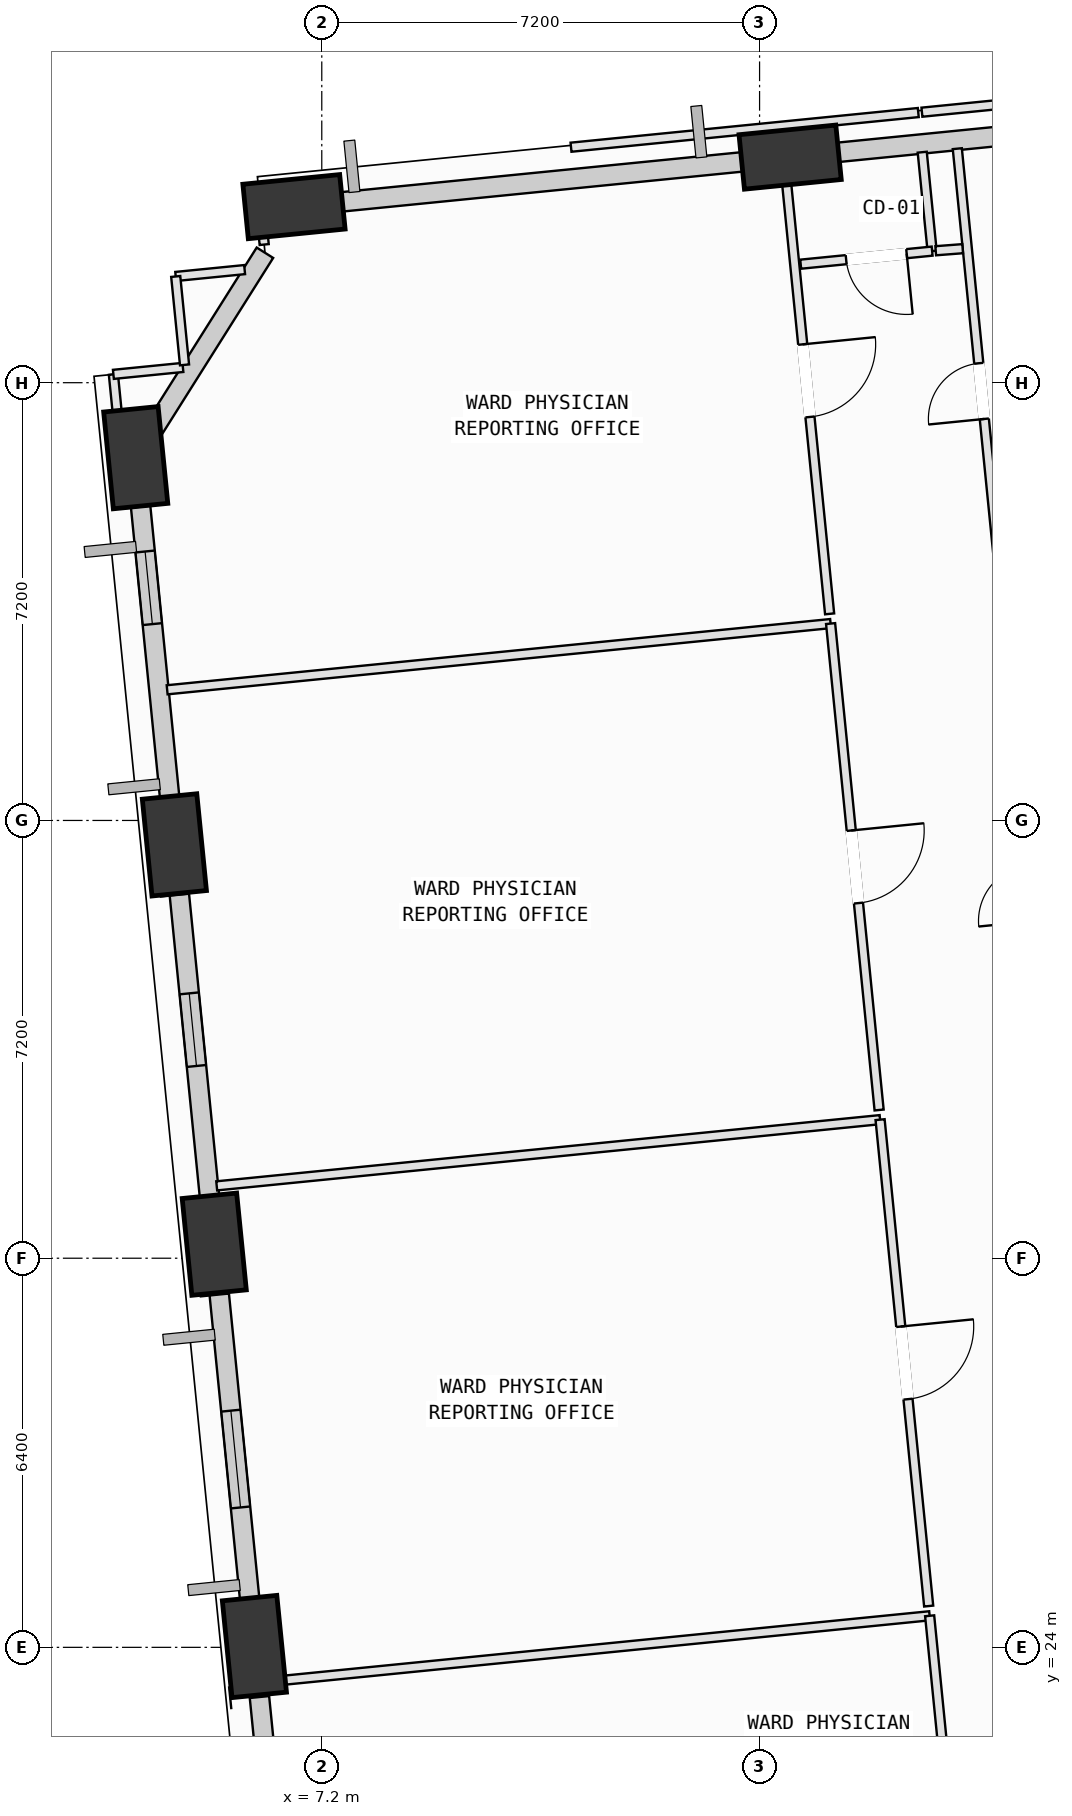
"""IFC4 building model, lengths in metres.
Left out: names, types, materials, properties, quantities, classifications, styles, units other than length and angle.
Written with IfcOpenShell. Run it as: python <this file> out.ifc"""

import sys

from ifc_helpers import new_model, si_unit, direction, frame, frame_2d, origin, origin_2d, place, context, subcontext, project, spatial, rectangle, extrude, element, fill, save


model = new_model("IFC4")
c1 = context("Model", 3, precision=1e-05, world=origin(), true_north=direction((0.0, 1.0)))
c2 = subcontext(c1, "Body", "Model", "MODEL_VIEW")
j1 = project(units=[si_unit("LENGTHUNIT", "METRE"), si_unit("PLANEANGLEUNIT", "RADIAN")], contexts=[c1])
p1 = place(None, origin())
s1 = spatial("IfcSite", under=j1, at=p1, CompositionType="ELEMENT")
p2 = place(p1, origin())
s2 = spatial("IfcBuilding", under=s1, at=p2, CompositionType="ELEMENT")
p3 = place(p2, frame((0.0, 0.0, 47.0)))
s3 = spatial("IfcBuildingStorey", under=s2, at=p3, CompositionType="ELEMENT", Elevation=47.0)
p4 = place(p3, frame((14.903, 48.51, 0.002), z_axis=(-0.096922045865, -0.077707356347, 0.992253840403), x_axis=(0.699324081061, -0.714698257248, 0.01233818203)))
e1 = element("IfcColumn", 1, at=p4, inside=s3, PredefinedType="COLUMN", context=c2, shape_type="SweptSolid", body=[
    extrude(rectangle(XDim=1.6, YDim=0.9, at=origin_2d()), origin(), (0.0, 0.0, 1.0), 4.028),
])
p5 = place(p3, frame((6.743, 47.696, 0.002), z_axis=(-0.092963260018, -0.110915202947, 0.989472409945), x_axis=(0.825741644185, -0.563865350369, 0.014373715995)))
e2 = element("IfcColumn", 2, at=p5, inside=s3, PredefinedType="COLUMN", context=c2, shape_type="SweptSolid", body=[
    extrude(rectangle(XDim=1.6, YDim=0.9, at=origin_2d()), origin(), (0.0, 0.0, 1.0), 4.039),
])
p6 = place(p3, frame((4.14, 43.567, 0.002), z_axis=(-0.075994605192, -0.121458362634, 0.9896831241), x_axis=(0.438151249377, 0.8875238919, 0.142565156951)))
e3 = element("IfcColumn", 3, at=p6, inside=s3, PredefinedType="COLUMN", context=c2, shape_type="SweptSolid", body=[
    extrude(rectangle(XDim=1.6, YDim=0.9, at=origin_2d()), origin(), (0.0, 0.0, 1.0), 4.038),
])
p7 = place(p3, frame((4.776, 37.198, 0.002), z_axis=(-0.049976419905, -0.118853013156, 0.991653325874), x_axis=(0.290924984757, 0.948104928167, 0.12829535623)))
e4 = element("IfcColumn", 4, at=p7, inside=s3, PredefinedType="COLUMN", context=c2, shape_type="SweptSolid", body=[
    extrude(rectangle(XDim=1.6, YDim=0.9, at=origin_2d()), origin(), (0.0, 0.0, 1.0), 4.03),
])
p8 = place(p3, frame((5.432, 30.631, 0.002), z_axis=(-0.023050008903, -0.116099255371, 0.992970120392), x_axis=(0.094992830329, 0.988485824862, 0.117780033251)))
e5 = element("IfcColumn", 5, at=p8, inside=s3, PredefinedType="COLUMN", context=c2, shape_type="SweptSolid", body=[
    extrude(rectangle(XDim=1.6, YDim=0.9, at=origin_2d()), origin(), (0.0, 0.0, 1.0), 4.025),
])
p9 = place(p3, frame((6.092, 24.014, 0.002), z_axis=(0.004187870803, -0.113254593007, 0.99355717445), x_axis=(-0.135784547747, 0.984299301738, 0.112771632916)))
e6 = element("IfcColumn", 6, at=p9, inside=s3, PredefinedType="COLUMN", context=c2, shape_type="SweptSolid", body=[
    extrude(rectangle(XDim=1.6, YDim=0.9, at=origin_2d()), origin(), (0.0, 0.0, 1.0), 4.022),
])
p10 = place(p3, frame((15.283, 48.548, 0.0), z_axis=(0.0, 0.0, 1.0), x_axis=(0.995052021169, 0.099355297633, 0.0)))
e7 = element("IfcWall", 7, at=p10, inside=s3, PredefinedType="SOLIDWALL", context=c2, shape_type="SweptSolid", body=[
    extrude(rectangle(XDim=7.003, YDim=0.32, at=frame_2d((3.501, 0.0))), origin(), (0.0, 0.0, 1.0), 3.165),
])
p11 = place(p3, frame((7.104, 47.732, 0.0), z_axis=(0.0, 0.0, 1.0), x_axis=(0.995058471393, 0.09929067685, 0.0)))
e8 = element("IfcWall", 8, at=p11, inside=s3, PredefinedType="SOLIDWALL", context=c2, shape_type="SweptSolid", body=[
    extrude(rectangle(XDim=7.035, YDim=0.32, at=frame_2d((3.517, 0.0))), origin(), (0.0, 0.0, 1.0), 3.165),
])
p12 = place(p3, frame((4.31, 43.836, 0.0), z_axis=(0.0, 0.0, 1.0), x_axis=(0.533233582552, 0.845968052848, 0.0)))
e9 = element("IfcWall", 9, at=p12, inside=s3, PredefinedType="SOLIDWALL", context=c2, shape_type="SweptSolid", body=[
    extrude(rectangle(XDim=3.666, YDim=0.32, at=frame_2d((1.833, 0.0))), origin(), (0.0, 0.0, 1.0), 3.165),
])
p13 = place(p3, frame((4.74, 37.563, 0.0), z_axis=(0.0, 0.0, 1.0), x_axis=(-0.099327854521, 0.995054760964, 0.0)))
e10 = element("IfcWall", 10, at=p13, inside=s3, PredefinedType="SOLIDWALL", context=c2, shape_type="SweptSolid", body=[
    extrude(rectangle(XDim=5.223, YDim=0.32, at=frame_2d((2.612, 0.0))), origin(), (0.0, 0.0, 1.0), 3.165),
])
p14 = place(p13, frame((3.282, 0.0, 0.75)))
e11 = element("IfcOpeningElement", 11, at=p14, cuts=e10, PredefinedType="OPENING", context=c2, shape_type="SweptSolid", body=[
    extrude(rectangle(XDim=1.2, YDim=1.75, at=frame_2d((0.6, 0.875))), frame((0.0, 0.17, 0.0), z_axis=(0.0, -1.0, 0.0), x_axis=(1.0, 0.0, 0.0)), (0.0, 0.0, 1.0), 0.34),
])
p15 = place(p3, frame((5.394, 31.005, 0.0), z_axis=(0.0, 0.0, 1.0), x_axis=(-0.099315735394, 0.995055970638, 0.0)))
e12 = element("IfcWall", 12, at=p15, inside=s3, PredefinedType="SOLIDWALL", context=c2, shape_type="SweptSolid", body=[
    extrude(rectangle(XDim=5.401, YDim=0.32, at=frame_2d((2.7, 0.0))), origin(), (0.0, 0.0, 1.0), 3.165),
])
p16 = place(p15, frame((2.57, 0.0, 0.75)))
e13 = element("IfcOpeningElement", 13, at=p16, cuts=e12, PredefinedType="OPENING", context=c2, shape_type="SweptSolid", body=[
    extrude(rectangle(XDim=1.2, YDim=1.75, at=frame_2d((0.6, 0.875))), frame((0.0, 0.17, 0.0), z_axis=(0.0, -1.0, 0.0), x_axis=(1.0, 0.0, 0.0)), (0.0, 0.0, 1.0), 0.34),
])
p17 = place(p3, frame((6.054, 24.392, 0.0), z_axis=(0.0, 0.0, 1.0), x_axis=(-0.099308134144, 0.995056729284, 0.0)))
e14 = element("IfcWall", 14, at=p17, inside=s3, PredefinedType="SOLIDWALL", context=c2, shape_type="SweptSolid", body=[
    extrude(rectangle(XDim=5.438, YDim=0.32, at=frame_2d((2.719, 0.0))), origin(), (0.0, 0.0, 1.0), 3.165),
])
p18 = place(p17, frame((1.918, 0.0, 0.75)))
e15 = element("IfcOpeningElement", 15, at=p18, cuts=e14, PredefinedType="OPENING", context=c2, shape_type="SweptSolid", body=[
    extrude(rectangle(XDim=1.6, YDim=1.95, at=frame_2d((0.8, 0.975))), frame((0.0, 0.17, 0.0), z_axis=(0.0, -1.0, 0.0), x_axis=(1.0, 0.0, 0.0)), (0.0, 0.0, 1.0), 0.34),
])
p19 = place(p3, frame((6.884, 16.082, 0.0), z_axis=(0.0, 0.0, 1.0), x_axis=(-0.099314033415, 0.99505614051, 0.0)))
e16 = element("IfcWall", 16, at=p19, inside=s3, PredefinedType="SOLIDWALL", context=c2, shape_type="SweptSolid", body=[
    extrude(rectangle(XDim=7.136, YDim=0.32, at=frame_2d((3.568, 0.0))), origin(), (0.0, 0.0, 1.0), 3.165),
])
p20 = place(p19, frame((2.569, 0.0, 0.75)))
e17 = element("IfcOpeningElement", 17, at=p20, cuts=e16, PredefinedType="OPENING", context=c2, shape_type="SweptSolid", body=[
    extrude(rectangle(XDim=2.0, YDim=1.95, at=frame_2d((1.0, 0.975))), frame((0.0, 0.17, 0.0), z_axis=(0.0, -1.0, 0.0), x_axis=(1.0, 0.0, 0.0)), (0.0, 0.0, 1.0), 0.34),
])
p21 = place(p3, frame((5.923, 23.394, 0.0), z_axis=(0.0, 0.0, 1.0), x_axis=(0.995058076509, 0.099294634167, 0.0)))
e18 = element("IfcWall", 18, at=p21, inside=s3, PredefinedType="PARTITIONING", context=c2, shape_type="SweptSolid", body=[
    extrude(rectangle(XDim=11.33, YDim=0.15, at=frame_2d((5.665, 0.0))), origin(), (0.0, 0.0, 1.0), 3.78),
])
p22 = place(p3, frame((17.197, 24.519, 0.0), z_axis=(0.0, 0.0, 1.0), x_axis=(0.099296099403, -0.995057930295, 0.0)))
e19 = element("IfcWall", 19, at=p22, inside=s3, PredefinedType="PARTITIONING", context=c2, shape_type="SweptSolid", body=[
    extrude(rectangle(XDim=3.958, YDim=0.15, at=frame_2d((1.979, 0.0))), origin(), (0.0, 0.0, 1.0), 3.78),
])
p23 = place(p3, frame((5.472, 31.59, 0.0), z_axis=(0.0, 0.0, 1.0), x_axis=(0.99505657203, 0.099309709794, 0.0)))
e20 = element("IfcWall", 20, at=p23, inside=s3, PredefinedType="PARTITIONING", context=c2, shape_type="SweptSolid", body=[
    extrude(rectangle(XDim=10.964, YDim=0.15, at=frame_2d((5.482, 0.0))), origin(), (0.0, 0.0, 1.0), 3.365),
])
p24 = place(p3, frame((16.382, 32.679, 0.0), z_axis=(0.0, 0.0, 1.0), x_axis=(0.099359401625, -0.995051611379, 0.0)))
e21 = element("IfcWall", 21, at=p24, inside=s3, PredefinedType="PARTITIONING", context=c2, shape_type="SweptSolid", body=[
    extrude(rectangle(XDim=8.04, YDim=0.15, at=frame_2d((4.02, 0.0))), origin(), (0.0, 0.0, 1.0), 3.78),
])
p25 = place(p24, frame((3.42, 0.0, 0.0)))
e22 = element("IfcOpeningElement", 22, at=p25, cuts=e21, PredefinedType="OPENING", context=c2, shape_type="SweptSolid", body=[
    extrude(rectangle(XDim=1.2, YDim=2.15, at=frame_2d((0.6, 1.075))), frame((0.0, 0.085, 0.0), z_axis=(0.0, -1.0, 0.0), x_axis=(1.0, 0.0, 0.0)), (0.0, 0.0, 1.0), 0.17),
])
p26 = place(p3, frame((5.907, 23.553, 0.0), z_axis=(0.0, 0.0, 1.0), x_axis=(-0.100034296973, 0.994983989534, 0.0)))
e23 = element("IfcWall", 23, at=p26, inside=s3, PredefinedType="PARTITIONING", context=c2, shape_type="SweptSolid", body=[
    extrude(rectangle(XDim=0.82, YDim=0.15, at=frame_2d((0.41, 0.0))), origin(), (0.0, 0.0, 1.0), 3.165),
])
p27 = place(p3, frame((5.285, 29.78, 0.0), z_axis=(0.0, 0.0, 1.0), x_axis=(-0.099243554259, 0.995063172335, 0.0)))
e24 = element("IfcWall", 24, at=p27, inside=s3, PredefinedType="PARTITIONING", context=c2, shape_type="SweptSolid", body=[
    extrude(rectangle(XDim=1.208, YDim=0.15, at=frame_2d((0.604, 0.0))), origin(), (0.0, 0.0, 1.0), 3.165),
])
p28 = place(p3, frame((4.657, 39.749, 0.0), z_axis=(0.0, 0.0, 1.0), x_axis=(0.99505745033, 0.099300909077, 0.0)))
e25 = element("IfcWall", 25, at=p28, inside=s3, PredefinedType="PARTITIONING", context=c2, shape_type="SweptSolid", body=[
    extrude(rectangle(XDim=10.965, YDim=0.15, at=frame_2d((5.483, 0.0))), origin(), (0.0, 0.0, 1.0), 3.78),
])
p29 = place(p3, frame((15.568, 40.838, 0.0), z_axis=(0.0, 0.0, 1.0), x_axis=(0.099239132337, -0.99506361335, 0.0)))
e26 = element("IfcWall", 26, at=p29, inside=s3, PredefinedType="PARTITIONING", context=c2, shape_type="SweptSolid", body=[
    extrude(rectangle(XDim=8.04, YDim=0.15, at=frame_2d((4.02, 0.0))), origin(), (0.0, 0.0, 1.0), 3.78),
])
p30 = place(p29, frame((3.42, 0.0, 0.0)))
e27 = element("IfcOpeningElement", 27, at=p30, cuts=e26, PredefinedType="OPENING", context=c2, shape_type="SweptSolid", body=[
    extrude(rectangle(XDim=1.2, YDim=2.15, at=frame_2d((0.6, 1.075))), frame((0.0, 0.085, 0.0), z_axis=(0.0, -1.0, 0.0), x_axis=(1.0, 0.0, 0.0)), (0.0, 0.0, 1.0), 0.17),
])
p31 = place(p3, frame((4.629, 36.356, 0.0), z_axis=(0.0, 0.0, 1.0), x_axis=(-0.099097432178, 0.995077735122, 0.0)))
e28 = element("IfcWall", 28, at=p31, inside=s3, PredefinedType="PARTITIONING", context=c2, shape_type="SweptSolid", body=[
    extrude(rectangle(XDim=1.19, YDim=0.15, at=frame_2d((0.595, 0.0))), origin(), (0.0, 0.0, 1.0), 3.165),
])
p32 = place(p3, frame((4.798, 46.547, 0.0), z_axis=(0.0, 0.0, 1.0), x_axis=(0.995079566283, 0.099079043022, 0.0)))
e29 = element("IfcWall", 29, at=p32, inside=s3, PredefinedType="PARTITIONING", context=c2, shape_type="SweptSolid", body=[
    extrude(rectangle(XDim=1.138, YDim=0.15, at=frame_2d((0.569, 0.0))), origin(), (0.0, 0.0, 1.0), 3.78),
])
p33 = place(p3, frame((6.253, 47.072, 0.0), z_axis=(0.0, 0.0, 1.0), x_axis=(-0.09973183877, 0.995014351824, 0.0)))
e30 = element("IfcWall", 30, at=p33, inside=s3, PredefinedType="PARTITIONING", context=c2, shape_type="SweptSolid", body=[
    extrude(rectangle(XDim=0.742, YDim=0.15, at=frame_2d((0.371, 0.0))), origin(), (0.0, 0.0, 1.0), 3.78),
])
p34 = place(p3, frame((6.179, 47.81, 0.0), z_axis=(0.0, 0.0, 1.0), x_axis=(0.995045125747, 0.099424331662, 0.0)))
e31 = element("IfcWall", 31, at=p34, inside=s3, PredefinedType="PARTITIONING", context=c2, shape_type="SweptSolid", body=[
    extrude(rectangle(XDim=0.914, YDim=0.15, at=frame_2d((0.457, 0.0))), origin(), (0.0, 0.0, 1.0), 3.78),
])
p35 = place(p3, frame((14.088, 48.599, 0.0), z_axis=(0.0, 0.0, 1.0), x_axis=(0.995033743716, 0.09953817793, 0.0)))
e32 = element("IfcWall", 32, at=p35, inside=s3, PredefinedType="PARTITIONING", context=c2, shape_type="SweptSolid", body=[
    extrude(rectangle(XDim=0.701, YDim=0.15, at=frame_2d((0.351, 0.0))), origin(), (0.0, 0.0, 1.0), 3.78),
])
p36 = place(p3, frame((14.786, 48.669, 0.0), z_axis=(0.0, 0.0, 1.0), x_axis=(0.09937829522, -0.995049724606, 0.0)))
e33 = element("IfcWall", 33, at=p36, inside=s3, PredefinedType="PARTITIONING", context=c2, shape_type="SweptSolid", body=[
    extrude(rectangle(XDim=7.709, YDim=0.15, at=frame_2d((3.854, 0.0))), origin(), (0.0, 0.0, 1.0), 2.865),
])
p37 = place(p36, frame((3.255, 0.0, 0.0)))
e34 = element("IfcOpeningElement", 34, at=p37, cuts=e33, PredefinedType="OPENING", context=c2, shape_type="SweptSolid", body=[
    extrude(rectangle(XDim=1.2, YDim=2.15, at=frame_2d((0.6, 1.075))), frame((0.0, 0.085, 0.0), z_axis=(0.0, -1.0, 0.0), x_axis=(1.0, 0.0, 0.0)), (0.0, 0.0, 1.0), 0.17),
])
p38 = place(p3, frame((3.992, 42.738, 0.0), z_axis=(0.0, 0.0, 1.0), x_axis=(-0.099098988495, 0.995077580131, 0.0)))
e35 = element("IfcWall", 35, at=p38, inside=s3, PredefinedType="PARTITIONING", context=c2, shape_type="SweptSolid", body=[
    extrude(rectangle(XDim=2.21, YDim=0.15, at=frame_2d((1.105, 0.0))), origin(), (0.0, 0.0, 1.0), 3.165),
])
p39 = place(p3, frame((3.773, 44.937, 0.0), z_axis=(0.0, 0.0, 1.0), x_axis=(0.995062409182, 0.0992512057, 0.0)))
e36 = element("IfcWall", 36, at=p39, inside=s3, PredefinedType="PARTITIONING", context=c2, shape_type="SweptSolid", body=[
    extrude(rectangle(XDim=1.149, YDim=0.15, at=frame_2d((0.574, 0.0))), origin(), (0.0, 0.0, 1.0), 3.78),
])
p40 = place(p3, frame((4.943, 45.093, 0.0), z_axis=(0.0, 0.0, 1.0), x_axis=(-0.099239051564, 0.995063621406, 0.0)))
e37 = element("IfcWall", 37, at=p40, inside=s3, PredefinedType="PARTITIONING", context=c2, shape_type="SweptSolid", body=[
    extrude(rectangle(XDim=1.461, YDim=0.15, at=frame_2d((0.731, 0.0))), origin(), (0.0, 0.0, 1.0), 3.78),
])
p41 = place(p3, frame((18.449, 40.674, 0.0), z_axis=(0.0, 0.0, 1.0), x_axis=(-0.09942831748, 0.995044727479, 0.0)))
e38 = element("IfcWall", 38, at=p41, inside=s3, PredefinedType="PARTITIONING", context=c2, shape_type="SweptSolid", body=[
    extrude(rectangle(XDim=8.015, YDim=0.15, at=frame_2d((4.007, 0.0))), origin(), (0.0, 0.0, 1.0), 3.78),
])
p42 = place(p41, frame((3.547, 0.0, 0.0)))
e39 = element("IfcOpeningElement", 39, at=p42, cuts=e38, PredefinedType="OPENING", context=c2, shape_type="SweptSolid", body=[
    extrude(rectangle(XDim=0.92, YDim=2.1, at=frame_2d((0.46, 1.05))), frame((0.0, 0.085, 0.0), z_axis=(0.0, -1.0, 0.0), x_axis=(1.0, 0.0, 0.0)), (0.0, 0.0, 1.0), 0.17),
])
p43 = place(p3, frame((11.299, 48.673, 0.0), z_axis=(0.0, 0.0, 1.0), x_axis=(0.995059067084, 0.099284706847, 0.0)))
e40 = element("IfcWall", 40, at=p43, inside=s3, PredefinedType="PARTITIONING", context=c2, shape_type="SweptSolid", body=[
    extrude(rectangle(XDim=5.739, YDim=0.15, at=frame_2d((2.87, 0.0))), origin(), (0.0, 0.0, 1.0), 3.78),
])
p44 = place(p3, frame((17.075, 48.591, 0.0), z_axis=(0.0, 0.0, 1.0), x_axis=(0.099740249677, -0.99501350875, 0.0)))
e41 = element("IfcWall", 41, at=p44, inside=s3, PredefinedType="PARTITIONING", context=c2, shape_type="SweptSolid", body=[
    extrude(rectangle(XDim=1.635, YDim=0.15, at=frame_2d((0.817, 0.0))), origin(), (0.0, 0.0, 1.0), 3.78),
])
p45 = place(p3, frame((17.238, 46.964, 0.0), z_axis=(0.0, 0.0, 1.0), x_axis=(-0.995088233916, -0.098991952809, 0.0)))
e42 = element("IfcWall", 42, at=p45, inside=s3, PredefinedType="PARTITIONING", context=c2, shape_type="SweptSolid", body=[
    extrude(rectangle(XDim=2.173, YDim=0.15, at=frame_2d((1.086, 0.0))), origin(), (0.0, 0.0, 1.0), 3.78),
])
p46 = place(p45, frame((0.421, 0.0, 0.0)))
e43 = element("IfcOpeningElement", 43, at=p46, cuts=e42, PredefinedType="OPENING", context=c2, shape_type="SweptSolid", body=[
    extrude(rectangle(XDim=1.0, YDim=2.12, at=frame_2d((0.5, 1.06))), frame((0.0, 0.085, 0.0), z_axis=(0.0, -1.0, 0.0), x_axis=(1.0, 0.0, 0.0)), (0.0, 0.0, 1.0), 0.17),
])
p47 = place(p3, frame((17.74, 47.004, 0.0), z_axis=(0.0, 0.0, 1.0), x_axis=(-0.997077075008, -0.0764022676, 0.0)))
e44 = element("IfcWall", 44, at=p47, inside=s3, PredefinedType="PARTITIONING", context=c2, shape_type="SweptSolid", body=[
    extrude(rectangle(XDim=0.444, YDim=0.15, at=frame_2d((0.222, 0.0))), origin(), (0.0, 0.0, 1.0), 3.78),
])
p48 = place(p3, frame((17.07, 49.249, 0.0), z_axis=(0.0, 0.0, 1.0), x_axis=(0.995056541935, 0.099310011345, 0.0)))
e45 = element("IfcWall", 45, at=p48, inside=s3, PredefinedType="PARTITIONING", context=c2, shape_type="SweptSolid", body=[
    extrude(rectangle(XDim=5.74, YDim=0.15, at=frame_2d((2.87, 0.0))), origin(), (0.0, 0.0, 1.0), 3.78),
])
p49 = place(p14, origin())
e46 = element("IfcWindow", 46, at=p49, inside=s3, PartitioningType="SINGLE_PANEL", PredefinedType="WINDOW", context=c2, shape_type="SweptSolid", body=[
    extrude(rectangle(XDim=1.2, YDim=1.75, at=frame_2d((0.6, 0.875))), frame((0.0, 0.03, 0.0), z_axis=(0.0, -1.0, 0.0), x_axis=(1.0, 0.0, 0.0)), (0.0, 0.0, 1.0), 0.06),
])
fill(e11, e46)
p50 = place(p16, origin())
e47 = element("IfcWindow", 47, at=p50, inside=s3, PartitioningType="SINGLE_PANEL", PredefinedType="WINDOW", context=c2, shape_type="SweptSolid", body=[
    extrude(rectangle(XDim=1.2, YDim=1.75, at=frame_2d((0.6, 0.875))), frame((0.0, 0.03, 0.0), z_axis=(0.0, -1.0, 0.0), x_axis=(1.0, 0.0, 0.0)), (0.0, 0.0, 1.0), 0.06),
])
fill(e13, e47)
p51 = place(p18, origin())
e48 = element("IfcWindow", 48, at=p51, inside=s3, PartitioningType="SINGLE_PANEL", PredefinedType="WINDOW", context=c2, shape_type="SweptSolid", body=[
    extrude(rectangle(XDim=1.6, YDim=1.95, at=frame_2d((0.8, 0.975))), frame((0.0, 0.03, 0.0), z_axis=(0.0, -1.0, 0.0), x_axis=(1.0, 0.0, 0.0)), (0.0, 0.0, 1.0), 0.06),
])
fill(e15, e48)
p52 = place(p25, origin())
e49 = element("IfcDoor", 49, at=p52, inside=s3, OperationType="SINGLE_SWING_LEFT", PredefinedType="DOOR", context=c2, shape_type="SweptSolid", body=[
    extrude(rectangle(XDim=1.2, YDim=2.15, at=frame_2d((0.6, 1.075))), frame((0.0, 0.025, 0.0), z_axis=(0.0, -1.0, 0.0), x_axis=(1.0, 0.0, 0.0)), (0.0, 0.0, 1.0), 0.05),
])
fill(e22, e49)
p53 = place(p30, origin())
e50 = element("IfcDoor", 50, at=p53, inside=s3, OperationType="SINGLE_SWING_LEFT", PredefinedType="DOOR", context=c2, shape_type="SweptSolid", body=[
    extrude(rectangle(XDim=1.2, YDim=2.15, at=frame_2d((0.6, 1.075))), frame((0.0, 0.025, 0.0), z_axis=(0.0, -1.0, 0.0), x_axis=(1.0, 0.0, 0.0)), (0.0, 0.0, 1.0), 0.05),
])
fill(e27, e50)
p54 = place(p37, origin())
e51 = element("IfcDoor", 51, at=p54, inside=s3, OperationType="SINGLE_SWING_LEFT", PredefinedType="DOOR", context=c2, shape_type="SweptSolid", body=[
    extrude(rectangle(XDim=1.2, YDim=2.15, at=frame_2d((0.6, 1.075))), frame((0.0, 0.025, 0.0), z_axis=(0.0, -1.0, 0.0), x_axis=(1.0, 0.0, 0.0)), (0.0, 0.0, 1.0), 0.05),
])
fill(e34, e51)
p55 = place(p42, origin())
e52 = element("IfcDoor", 52, at=p55, inside=s3, OperationType="SINGLE_SWING_LEFT", PredefinedType="DOOR", context=c2, shape_type="SweptSolid", body=[
    extrude(rectangle(XDim=0.92, YDim=2.1, at=frame_2d((0.46, 1.05))), frame((0.0, 0.025, 0.0), z_axis=(0.0, -1.0, 0.0), x_axis=(1.0, 0.0, 0.0)), (0.0, 0.0, 1.0), 0.05),
])
fill(e39, e52)
p56 = place(p46, origin())
e53 = element("IfcDoor", 53, at=p56, inside=s3, OperationType="SINGLE_SWING_LEFT", PredefinedType="DOOR", context=c2, shape_type="SweptSolid", body=[
    extrude(rectangle(XDim=1.0, YDim=2.12, at=frame_2d((0.5, 1.06))), frame((0.0, 0.025, 0.0), z_axis=(0.0, -1.0, 0.0), x_axis=(1.0, 0.0, 0.0)), (0.0, 0.0, 1.0), 0.05),
])
fill(e43, e53)
save(model, sys.argv[1])
